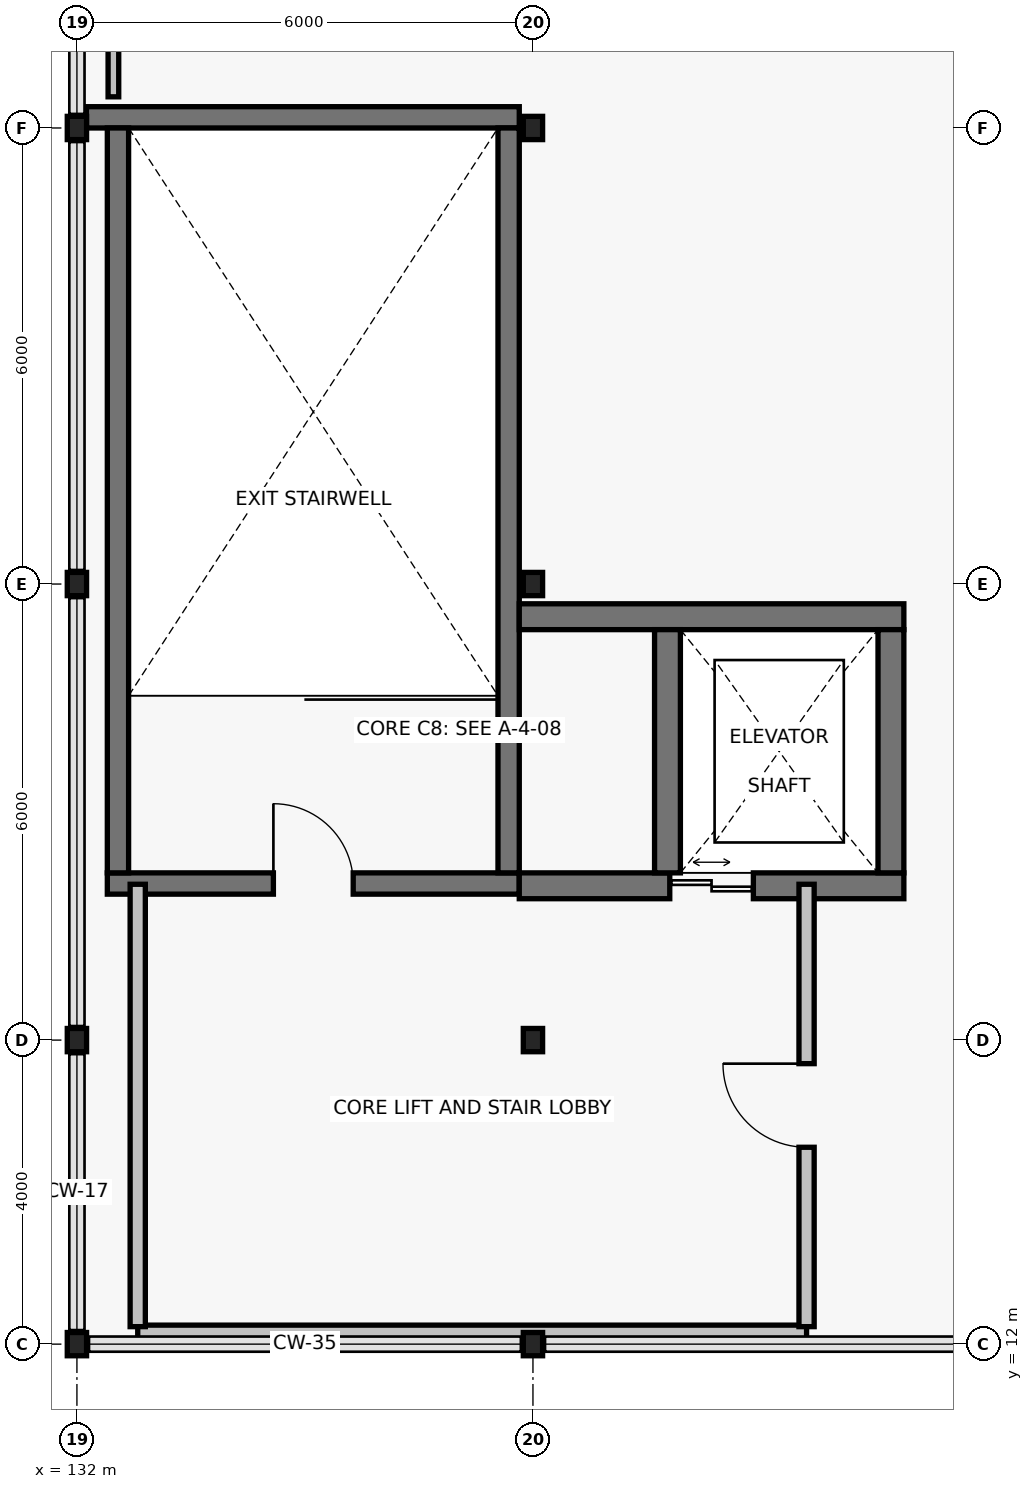
"""IFC4 building model, lengths in metres.
Left out: names, types, materials, properties, quantities, classifications, styles, units other than length and angle.
Written with IfcOpenShell. Run it as: python <this file> out.ifc"""

import sys

from ifc_helpers import new_model, si_unit, direction, frame, frame_2d, origin, origin_2d, place, context, subcontext, project, spatial, rectangle, i_section, extrude, element, fill, save


model = new_model("IFC4")
c1 = context("Model", 3, precision=1e-05, world=origin(), true_north=direction((0.0, 1.0)))
c2 = subcontext(c1, "Body", "Model", "MODEL_VIEW")
j1 = project(units=[si_unit("LENGTHUNIT", "METRE"), si_unit("PLANEANGLEUNIT", "RADIAN")], contexts=[c1])
p1 = place(None, origin())
s1 = spatial("IfcSite", under=j1, at=p1, CompositionType="ELEMENT")
p2 = place(p1, origin())
s2 = spatial("IfcBuilding", under=s1, at=p2, CompositionType="ELEMENT")
p3 = place(p2, frame((0.0, 0.0, 11.4)))
s3 = spatial("IfcBuildingStorey", under=s2, at=p3, CompositionType="ELEMENT", Elevation=11.4)
for number, where, z_axis, x_axis in (
    (1, (132.0, 12.0, 0.0), (0.0, 0.0, 1.0), (1.0, 0.0, 0.0)),
    (2, (132.0, 16.0, 0.0), (0.0, 0.0, 1.0), (1.0, 0.0, 0.0)),
    (3, (132.0, 22.0, 0.0), (0.0, 0.0, 1.0), (1.0, 0.0, 0.0)),
    (4, (132.0, 28.0, 0.0), (0.0, 0.0, 1.0), (1.0, 0.0, 0.0)),
    (5, (138.0, 12.0, 0.0), (0.0, 0.0, 1.0), (1.0, 0.0, 0.0)),
    (6, (138.0, 16.0, 0.0), (0.0, 0.0, 1.0), (1.0, 0.0, 0.0)),
    (7, (138.0, 22.0, 0.0), (0.0, 0.0, 1.0), (1.0, 0.0, 0.0)),
    (8, (138.0, 28.0, 0.0), (0.0, 0.0, 1.0), (1.0, 0.0, 0.0)),
):
    element("IfcColumn", number, at=place(p3, frame(where, z_axis=z_axis, x_axis=x_axis)), inside=s3, PredefinedType="COLUMN", context=c2, shape_type="SweptSolid", body=[
        extrude(i_section(OverallWidth=0.254, OverallDepth=0.306, WebThickness=0.009, FlangeThickness=0.015, FilletRadius=0.013, at=origin_2d()), origin(), (0.0, 0.0, 1.0), 4.0),
    ])
p4 = place(p3, frame((132.4, 18.06, 0.0), z_axis=(0.0, 0.0, 1.0), x_axis=(1.0, 0.0, 0.0)))
e9 = element("IfcWall", 9, at=p4, inside=s3, PredefinedType="SHEAR", context=c2, shape_type="SweptSolid", body=[
    extrude(rectangle(XDim=5.42, YDim=0.28, at=frame_2d((2.71, 0.0))), origin(), (0.0, 0.0, 1.0), 3.76),
])
p5 = place(p4, frame((2.185, 0.0, 0.0)))
e10 = element("IfcOpeningElement", 10, at=p5, cuts=e9, PredefinedType="OPENING", context=c2, shape_type="SweptSolid", body=[
    extrude(rectangle(XDim=1.05, YDim=2.15, at=frame_2d((0.525, 1.075))), frame((0.0, 0.155, 0.0), z_axis=(0.0, -1.0, 0.0), x_axis=(1.0, 0.0, 0.0)), (0.0, 0.0, 1.0), 0.31),
])
p6 = place(p3, frame((137.82, 28.14, 0.0), z_axis=(0.0, 0.0, 1.0), x_axis=(-1.0, 0.0, 0.0)))
e11 = element("IfcWall", 11, at=p6, inside=s3, PredefinedType="SHEAR", context=c2, shape_type="SweptSolid", body=[
    extrude(rectangle(XDim=5.695, YDim=0.28, at=frame_2d((2.848, 0.0))), origin(), (0.0, 0.0, 1.0), 3.76),
])
for number, where, z_axis, x_axis in (
    (12, (132.54, 28.0, 0.0), (0.0, 0.0, 1.0), (0.0, -1.0, 0.0)),
    (13, (137.68, 18.2, 0.0), (0.0, 0.0, 1.0), (0.0, 1.0, 0.0)),
):
    element("IfcWall", number, at=place(p3, frame(where, z_axis=z_axis, x_axis=x_axis)), inside=s3, PredefinedType="SHEAR", context=c2, shape_type="SweptSolid", body=[
        extrude(rectangle(XDim=9.8, YDim=0.28, at=frame_2d((4.9, 0.0))), origin(), (0.0, 0.0, 1.0), 3.76),
    ])
p7 = place(p3, frame((137.82, 18.03, 0.0), z_axis=(0.0, 0.0, 1.0), x_axis=(1.0, 0.0, 0.0)))
e14 = element("IfcWall", 14, at=p7, inside=s3, PredefinedType="SHEAR", context=c2, shape_type="SweptSolid", body=[
    extrude(rectangle(XDim=5.06, YDim=0.34, at=frame_2d((2.53, 0.0))), origin(), (0.0, 0.0, 1.0), 3.76),
])
p8 = place(p7, frame((1.98, 0.0, 0.0)))
e15 = element("IfcOpeningElement", 15, at=p8, cuts=e14, PredefinedType="OPENING", context=c2, shape_type="SweptSolid", body=[
    extrude(rectangle(XDim=1.1, YDim=2.2, at=frame_2d((0.55, 1.1))), frame((0.0, 0.185, 0.0), z_axis=(0.0, -1.0, 0.0), x_axis=(1.0, 0.0, 0.0)), (0.0, 0.0, 1.0), 0.37),
])
p9 = place(p3, frame((142.88, 21.57, 0.0), z_axis=(0.0, 0.0, 1.0), x_axis=(-1.0, 0.0, 0.0)))
e16 = element("IfcWall", 16, at=p9, inside=s3, PredefinedType="SHEAR", context=c2, shape_type="SweptSolid", body=[
    extrude(rectangle(XDim=5.06, YDim=0.34, at=frame_2d((2.53, 0.0))), origin(), (0.0, 0.0, 1.0), 3.76),
])
for number, where, z_axis, x_axis in (
    (17, (139.77, 21.4, 0.0), (0.0, 0.0, 1.0), (0.0, -1.0, 0.0)),
    (18, (142.71, 18.2, 0.0), (0.0, 0.0, 1.0), (0.0, 1.0, 0.0)),
):
    element("IfcWall", number, at=place(p3, frame(where, z_axis=z_axis, x_axis=x_axis)), inside=s3, PredefinedType="SHEAR", context=c2, shape_type="SweptSolid", body=[
        extrude(rectangle(XDim=3.2, YDim=0.34, at=frame_2d((1.6, 0.0))), origin(), (0.0, 0.0, 1.0), 3.76),
    ])
p10 = place(p3, frame((132.8, 12.15, 0.0), z_axis=(0.0, 0.0, 1.0), x_axis=(1.0, 0.0, 0.0)))
e19 = element("IfcWall", 19, at=p10, inside=s3, PredefinedType="PARTITIONING", context=c2, shape_type="SweptSolid", body=[
    extrude(rectangle(XDim=8.8, YDim=0.2, at=frame_2d((4.4, 0.0))), origin(), (0.0, 0.0, 1.0), 3.111),
])
p11 = place(p3, frame((132.8, 18.05, 0.0), z_axis=(0.0, 0.0, 1.0), x_axis=(0.0, -1.0, 0.0)))
e20 = element("IfcWall", 20, at=p11, inside=s3, PredefinedType="PARTITIONING", context=c2, shape_type="SweptSolid", body=[
    extrude(rectangle(XDim=5.82, YDim=0.2, at=frame_2d((2.91, 0.0))), origin(), (0.0, 0.0, 1.0), 3.294),
])
p12 = place(p3, frame((141.6, 12.23, 0.0), z_axis=(0.0, 0.0, 1.0), x_axis=(0.0, 1.0, 0.0)))
e21 = element("IfcWall", 21, at=p12, inside=s3, PredefinedType="PARTITIONING", context=c2, shape_type="SweptSolid", body=[
    extrude(rectangle(XDim=5.82, YDim=0.2, at=frame_2d((2.91, 0.0))), origin(), (0.0, 0.0, 1.0), 3.111),
])
p13 = place(p12, frame((2.36, 0.0, 0.0)))
e22 = element("IfcOpeningElement", 22, at=p13, cuts=e21, PredefinedType="OPENING", context=c2, shape_type="SweptSolid", body=[
    extrude(rectangle(XDim=1.1, YDim=2.15, at=frame_2d((0.55, 1.075))), frame((0.0, 0.115, 0.0), z_axis=(0.0, -1.0, 0.0), x_axis=(1.0, 0.0, 0.0)), (0.0, 0.0, 1.0), 0.23),
])
p14 = place(p3, frame((132.48, 28.41, 0.0), z_axis=(0.0, 0.0, 1.0), x_axis=(0.0, 1.0, 0.0)))
e23 = element("IfcWall", 23, at=p14, inside=s3, PredefinedType="PARTITIONING", context=c2, shape_type="SweptSolid", body=[
    extrude(rectangle(XDim=14.91, YDim=0.14, at=frame_2d((7.455, 0.0))), origin(), (0.0, 0.0, 1.0), 3.187),
])
p15 = place(p14, frame((6.855, 0.0, 0.0)))
e24 = element("IfcOpeningElement", 24, at=p15, cuts=e23, PredefinedType="OPENING", context=c2, shape_type="SweptSolid", body=[
    extrude(rectangle(XDim=1.2, YDim=2.15, at=frame_2d((0.6, 1.075))), frame((0.0, 0.085, 0.0), z_axis=(0.0, -1.0, 0.0), x_axis=(1.0, 0.0, 0.0)), (0.0, 0.0, 1.0), 0.17),
])
p16 = place(p5, origin())
e25 = element("IfcDoor", 25, at=p16, inside=s3, OperationType="SINGLE_SWING_LEFT", PredefinedType="DOOR", context=c2, shape_type="SweptSolid", body=[
    extrude(rectangle(XDim=1.05, YDim=2.15, at=frame_2d((0.525, 1.075))), frame((0.0, 0.025, 0.0), z_axis=(0.0, -1.0, 0.0), x_axis=(1.0, 0.0, 0.0)), (0.0, 0.0, 1.0), 0.05),
])
fill(e10, e25)
p17 = place(p8, origin())
e26 = element("IfcDoor", 26, at=p17, inside=s3, OperationType="DOUBLE_DOOR_SLIDING", PredefinedType="DOOR", context=c2, shape_type="SweptSolid", body=[
    extrude(rectangle(XDim=1.1, YDim=2.2, at=frame_2d((0.55, 1.1))), frame((0.0, 0.025, 0.0), z_axis=(0.0, -1.0, 0.0), x_axis=(1.0, 0.0, 0.0)), (0.0, 0.0, 1.0), 0.05),
])
fill(e15, e26)
p18 = place(p13, origin())
e27 = element("IfcDoor", 27, at=p18, inside=s3, OperationType="SINGLE_SWING_RIGHT", PredefinedType="DOOR", context=c2, shape_type="SweptSolid", body=[
    extrude(rectangle(XDim=1.1, YDim=2.15, at=frame_2d((0.55, 1.075))), frame((0.0, 0.025, 0.0), z_axis=(0.0, -1.0, 0.0), x_axis=(1.0, 0.0, 0.0)), (0.0, 0.0, 1.0), 0.05),
])
fill(e22, e27)
save(model, sys.argv[1])
